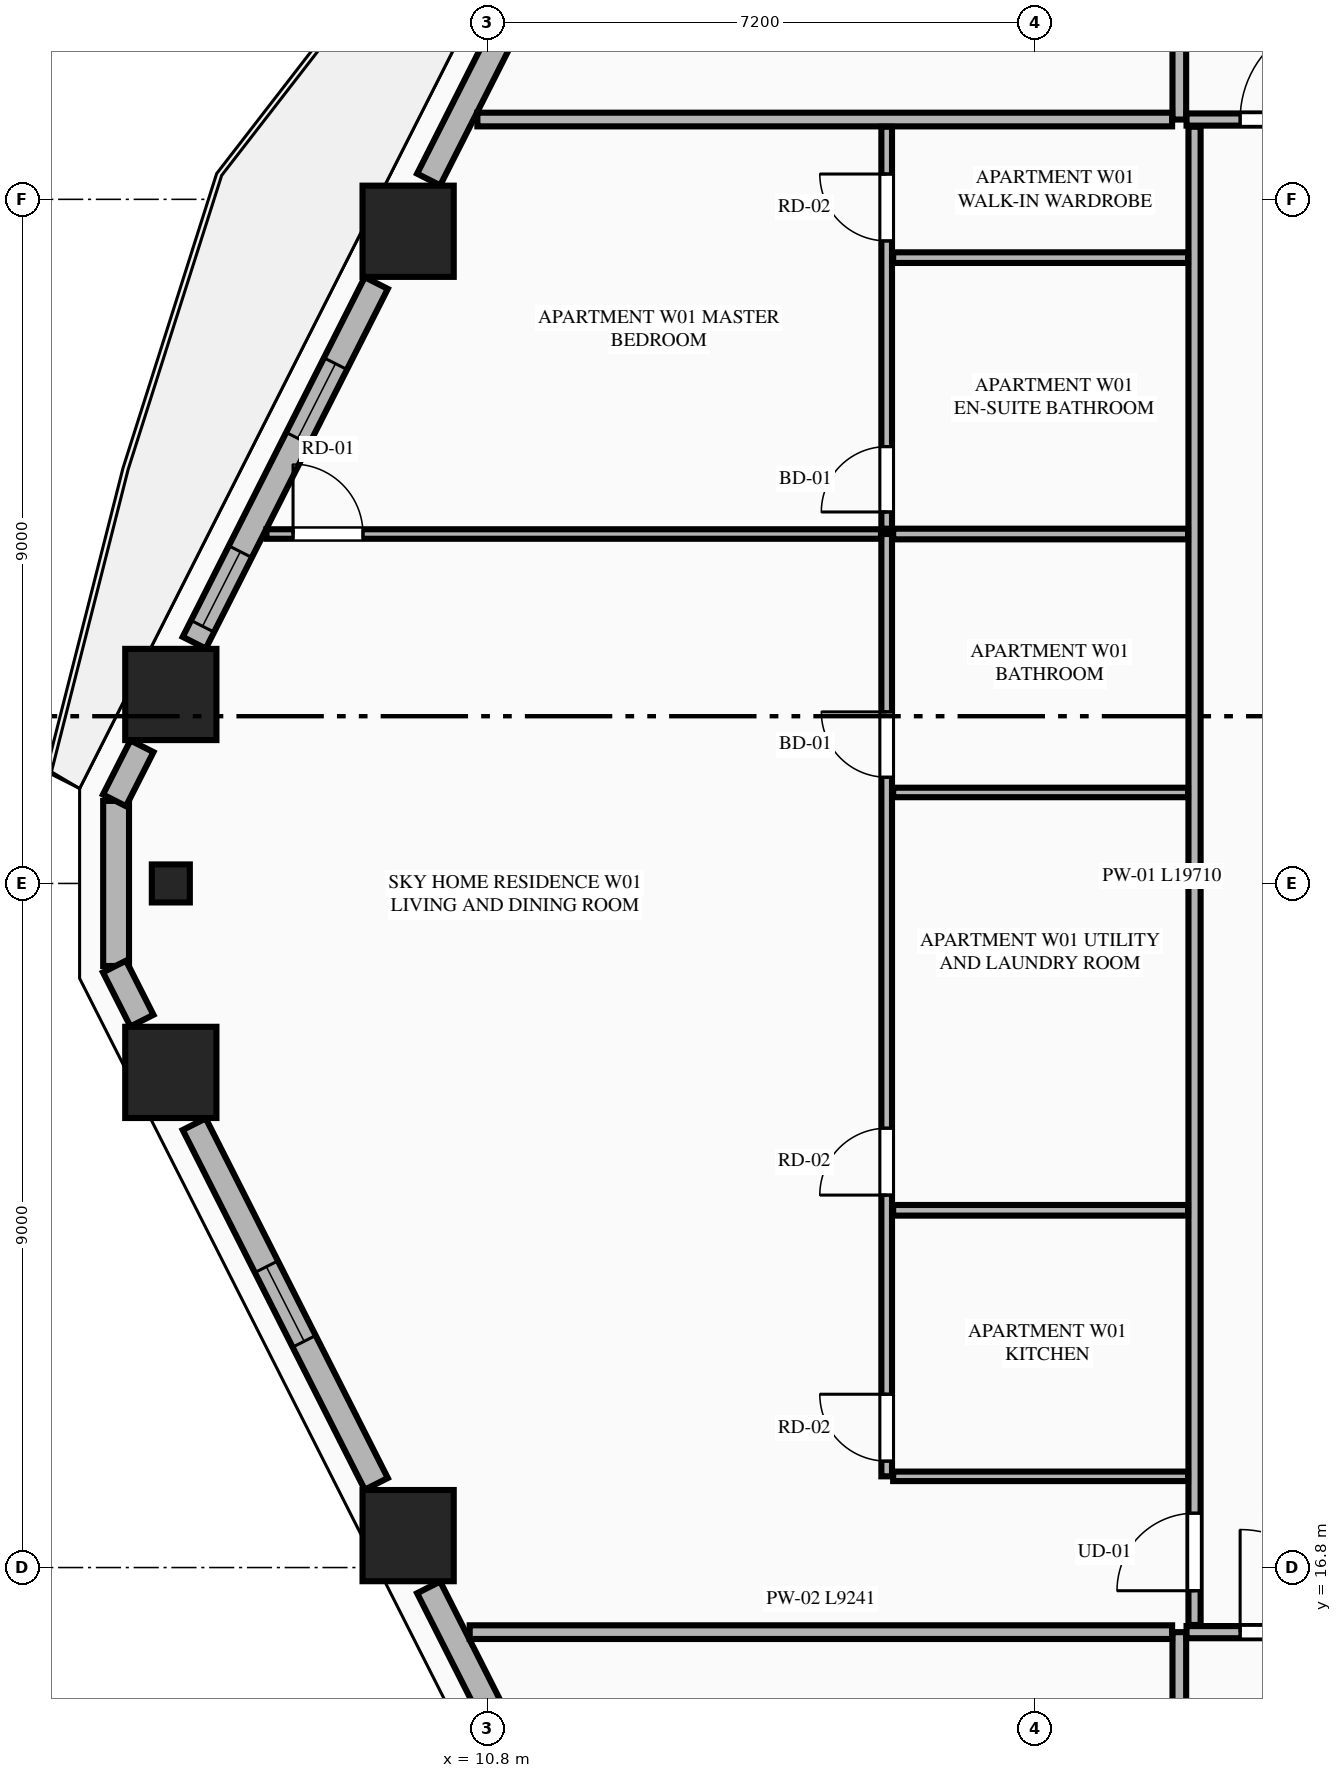
"""IFC4 building model, lengths in metres.
Left out: names, types, materials, properties, quantities, classifications, styles, units other than length and angle.
Written with IfcOpenShell. Run it as: python <this file> out.ifc"""

import sys

from ifc_helpers import new_model, si_unit, direction, frame, frame_2d, origin, origin_2d, place, context, subcontext, project, spatial, rectangle, extrude, element, fill, save


model = new_model("IFC4")
c1 = context("Model", 3, precision=1e-05, world=origin(), true_north=direction((0.0, 1.0)))
c2 = subcontext(c1, "Body", "Model", "MODEL_VIEW")
j1 = project(units=[si_unit("LENGTHUNIT", "METRE"), si_unit("PLANEANGLEUNIT", "RADIAN")], contexts=[c1])
p1 = place(None, origin())
s1 = spatial("IfcSite", under=j1, at=p1, CompositionType="ELEMENT")
p2 = place(p1, origin())
s2 = spatial("IfcBuilding", under=s1, at=p2, CompositionType="ELEMENT")
p3 = place(p2, frame((0.0, 0.0, 53.3)))
s3 = spatial("IfcBuildingStorey", under=s2, at=p3, CompositionType="ELEMENT", Elevation=53.3)
for number, where, z_axis, x_axis in (
    (1, (9.754, 34.38, 0.0), (0.0, 0.0, 1.0), (1.0, 0.0, 0.0)),
    (2, (6.632, 28.286, 0.0), (0.0, 0.0, 1.0), (1.0, 0.0, 0.0)),
    (3, (6.632, 23.314, 0.0), (0.0, 0.0, 1.0), (1.0, 0.0, 0.0)),
    (4, (9.754, 17.22, 0.0), (0.0, 0.0, 1.0), (1.0, 0.0, 0.0)),
):
    element("IfcColumn", number, at=place(p3, frame(where, z_axis=z_axis, x_axis=x_axis)), inside=s3, PredefinedType="COLUMN", context=c2, shape_type="SweptSolid", body=[
        extrude(rectangle(XDim=1.2, YDim=1.2, at=origin_2d()), origin(), (0.0, 0.0, 1.0), 3.55),
    ])
p4 = place(p3, frame((6.632, 25.8, 0.0), z_axis=(0.0, 0.0, 1.0), x_axis=(0.0, -1.0, 0.0)))
e5 = element("IfcColumn", 5, at=p4, inside=s3, PredefinedType="PILASTER", context=c2, shape_type="SweptSolid", body=[
    extrude(rectangle(XDim=0.5, YDim=0.35, at=origin_2d()), origin(), (0.0, 0.0, 1.0), 3.55),
])
p5 = place(p3, frame((5.912, 26.886, 0.0), z_axis=(0.0, 0.0, 1.0), x_axis=(0.0, -1.0, 0.0)))
e6 = element("IfcWall", 6, at=p5, inside=s3, PredefinedType="STANDARD", context=c2, shape_type="SweptSolid", body=[
    extrude(rectangle(XDim=2.172, YDim=0.34, at=frame_2d((1.086, 0.0))), origin(), (0.0, 0.0, 1.0), 3.33),
])
p6 = place(p3, frame((12.529, 40.01, 0.0), z_axis=(0.0, 0.0, 1.0), x_axis=(-0.451627137896, -0.892206774417, 0.0)))
e7 = element("IfcWall", 7, at=p6, inside=s3, PredefinedType="STANDARD", context=c2, shape_type="SweptSolid", body=[
    extrude(rectangle(XDim=5.547, YDim=0.34, at=frame_2d((2.773, 0.0))), origin(), (0.0, 0.0, 1.0), 2.787),
])
p7 = place(p6, frame((1.656, 0.0, 0.0)))
e8 = element("IfcOpeningElement", 8, at=p7, cuts=e7, PredefinedType="OPENING", context=c2, shape_type="SweptSolid", body=[
    extrude(rectangle(XDim=1.1, YDim=2.25, at=frame_2d((0.55, 1.125))), frame((0.0, 0.18, 0.0), z_axis=(0.0, -1.0, 0.0), x_axis=(1.0, 0.0, 0.0)), (0.0, 0.0, 1.0), 0.36),
])
p8 = place(p3, frame((9.335, 33.699, 0.0), z_axis=(0.0, 0.0, 1.0), x_axis=(-0.451590635984, -0.892225250422, 0.0)))
e9 = element("IfcWall", 9, at=p8, inside=s3, PredefinedType="STANDARD", context=c2, shape_type="SweptSolid", body=[
    extrude(rectangle(XDim=5.303, YDim=0.34, at=frame_2d((2.652, 0.0))), origin(), (0.0, 0.0, 1.0), 2.787),
])
p9 = place(p8, frame((1.189, 0.0, 0.75)))
e10 = element("IfcOpeningElement", 10, at=p9, cuts=e9, PredefinedType="OPENING", context=c2, shape_type="SweptSolid", body=[
    extrude(rectangle(XDim=1.1, YDim=1.887, at=frame_2d((0.55, 0.943))), frame((0.0, 0.18, 0.0), z_axis=(0.0, -1.0, 0.0), x_axis=(1.0, 0.0, 0.0)), (0.0, 0.0, 1.0), 0.36),
])
p10 = place(p8, frame((3.961, 0.0, 0.75)))
e11 = element("IfcOpeningElement", 11, at=p10, cuts=e9, PredefinedType="OPENING", context=c2, shape_type="SweptSolid", body=[
    extrude(rectangle(XDim=1.1, YDim=1.887, at=frame_2d((0.55, 0.943))), frame((0.0, 0.18, 0.0), z_axis=(0.0, -1.0, 0.0), x_axis=(1.0, 0.0, 0.0)), (0.0, 0.0, 1.0), 0.36),
])
for number, where, z_axis, x_axis in (
    (12, (6.252, 27.605, 0.0), (0.0, 0.0, 1.0), (-0.452, -0.892, 0.0)),
    (13, (5.891, 24.707, 0.0), (0.0, 0.0, 1.0), (0.452, -0.892, 0.0)),
):
    element("IfcWall", number, at=place(p3, frame(where, z_axis=z_axis, x_axis=x_axis)), inside=s3, PredefinedType="STANDARD", context=c2, shape_type="SweptSolid", body=[
        extrude(rectangle(XDim=0.798, YDim=0.34, at=frame_2d((0.399, 0.0))), origin(), (0.0, 0.0, 1.0), 3.33),
    ])
p11 = place(p3, frame((6.94, 22.633, 0.0), z_axis=(0.0, 0.0, 1.0), x_axis=(0.451572088722, -0.892234637686, 0.0)))
e14 = element("IfcWall", 14, at=p11, inside=s3, PredefinedType="STANDARD", context=c2, shape_type="SweptSolid", body=[
    extrude(rectangle(XDim=5.304, YDim=0.34, at=frame_2d((2.652, 0.0))), origin(), (0.0, 0.0, 1.0), 2.787),
])
p12 = place(p11, frame((2.102, 0.0, 0.75)))
e15 = element("IfcOpeningElement", 15, at=p12, cuts=e14, PredefinedType="OPENING", context=c2, shape_type="SweptSolid", body=[
    extrude(rectangle(XDim=1.1, YDim=1.887, at=frame_2d((0.55, 0.943))), frame((0.0, 0.18, 0.0), z_axis=(0.0, -1.0, 0.0), x_axis=(1.0, 0.0, 0.0)), (0.0, 0.0, 1.0), 0.36),
])
p13 = place(p3, frame((10.024, 16.539, 0.0), z_axis=(0.0, 0.0, 1.0), x_axis=(0.451627137896, -0.892206774417, 0.0)))
e16 = element("IfcWall", 16, at=p13, inside=s3, PredefinedType="STANDARD", context=c2, shape_type="SweptSolid", body=[
    extrude(rectangle(XDim=5.547, YDim=0.34, at=frame_2d((2.773, 0.0))), origin(), (0.0, 0.0, 1.0), 2.787),
])
p14 = place(p13, frame((2.223, 0.0, 0.75)))
e17 = element("IfcOpeningElement", 17, at=p14, cuts=e16, PredefinedType="OPENING", context=c2, shape_type="SweptSolid", body=[
    extrude(rectangle(XDim=1.1, YDim=1.887, at=frame_2d((0.55, 0.943))), frame((0.0, 0.18, 0.0), z_axis=(0.0, -1.0, 0.0), x_axis=(1.0, 0.0, 0.0)), (0.0, 0.0, 1.0), 0.36),
])
p15 = place(p3, frame((19.9, 2.455, 0.0), z_axis=(0.0, 0.0, 1.0), x_axis=(0.0, 1.0, 0.0)))
e18 = element("IfcWall", 18, at=p15, inside=s3, PredefinedType="PARTITIONING", context=c2, shape_type="SweptSolid", body=[
    extrude(rectangle(XDim=13.495, YDim=0.18, at=frame_2d((6.748, 0.0))), origin(), (0.0, 0.0, 1.0), 3.33),
])
p16 = place(p3, frame((19.995, 15.95, 0.0), z_axis=(0.0, 0.0, 1.0), x_axis=(1.0, 0.0, 0.0)))
e19 = element("IfcWall", 19, at=p16, inside=s3, PredefinedType="PARTITIONING", context=c2, shape_type="SweptSolid", body=[
    extrude(rectangle(XDim=16.432, YDim=0.16, at=frame_2d((8.216, 0.0))), origin(), (0.0, 0.0, 1.0), 3.33),
])
p17 = place(p16, frame((0.705, 0.0, 0.0)))
e20 = element("IfcOpeningElement", 20, at=p17, cuts=e19, PredefinedType="OPENING", context=c2, shape_type="SweptSolid", body=[
    extrude(rectangle(XDim=1.35, YDim=2.35, at=frame_2d((0.675, 1.175))), frame((0.0, 0.09, 0.0), z_axis=(0.0, -1.0, 0.0), x_axis=(1.0, 0.0, 0.0)), (0.0, 0.0, 1.0), 0.18),
])
p18 = place(p3, frame((19.9, 35.85, 0.0), z_axis=(0.0, 0.0, 1.0), x_axis=(0.0, 1.0, 0.0)))
e21 = element("IfcWall", 21, at=p18, inside=s3, PredefinedType="PARTITIONING", context=c2, shape_type="SweptSolid", body=[
    extrude(rectangle(XDim=13.295, YDim=0.18, at=frame_2d((6.647, 0.0))), origin(), (0.0, 0.0, 1.0), 3.33),
])
p19 = place(p3, frame((19.995, 35.85, 0.0), z_axis=(0.0, 0.0, 1.0), x_axis=(1.0, 0.0, 0.0)))
e22 = element("IfcWall", 22, at=p19, inside=s3, PredefinedType="PARTITIONING", context=c2, shape_type="SweptSolid", body=[
    extrude(rectangle(XDim=16.432, YDim=0.16, at=frame_2d((8.216, 0.0))), origin(), (0.0, 0.0, 1.0), 3.33),
])
p20 = place(p19, frame((0.705, 0.0, 0.0)))
e23 = element("IfcOpeningElement", 23, at=p20, cuts=e22, PredefinedType="OPENING", context=c2, shape_type="SweptSolid", body=[
    extrude(rectangle(XDim=1.35, YDim=2.35, at=frame_2d((0.675, 1.175))), frame((0.0, 0.09, 0.0), z_axis=(0.0, -1.0, 0.0), x_axis=(1.0, 0.0, 0.0)), (0.0, 0.0, 1.0), 0.18),
])
p21 = place(p3, frame((10.564, 15.95, 0.0), z_axis=(0.0, 0.0, 1.0), x_axis=(1.0, 0.0, 0.0)))
e24 = element("IfcWall", 24, at=p21, inside=s3, PredefinedType="PARTITIONING", context=c2, shape_type="SweptSolid", body=[
    extrude(rectangle(XDim=9.241, YDim=0.18, at=frame_2d((4.621, 0.0))), origin(), (0.0, 0.0, 1.0), 3.33),
])
p22 = place(p3, frame((10.665, 35.85, 0.0), z_axis=(0.0, 0.0, 1.0), x_axis=(1.0, 0.0, 0.0)))
e25 = element("IfcWall", 25, at=p22, inside=s3, PredefinedType="PARTITIONING", context=c2, shape_type="SweptSolid", body=[
    extrude(rectangle(XDim=9.14, YDim=0.18, at=frame_2d((4.57, 0.0))), origin(), (0.0, 0.0, 1.0), 3.33),
])
p23 = place(p3, frame((20.1, 16.045, 0.0), z_axis=(0.0, 0.0, 1.0), x_axis=(0.0, 1.0, 0.0)))
e26 = element("IfcWall", 26, at=p23, inside=s3, PredefinedType="PARTITIONING", context=c2, shape_type="SweptSolid", body=[
    extrude(rectangle(XDim=19.71, YDim=0.16, at=frame_2d((9.855, 0.0))), origin(), (0.0, 0.0, 1.0), 3.33),
])
p24 = place(p23, frame((0.45, 0.0, 0.0)))
e27 = element("IfcOpeningElement", 27, at=p24, cuts=e26, PredefinedType="OPENING", context=c2, shape_type="SweptSolid", body=[
    extrude(rectangle(XDim=1.02, YDim=2.25, at=frame_2d((0.51, 1.125))), frame((0.0, 0.09, 0.0), z_axis=(0.0, -1.0, 0.0), x_axis=(1.0, 0.0, 0.0)), (0.0, 0.0, 1.0), 0.18),
])
p25 = place(p3, frame((16.135, 18.0, 0.0), z_axis=(0.0, 0.0, 1.0), x_axis=(1.0, 0.0, 0.0)))
e28 = element("IfcWall", 28, at=p25, inside=s3, PredefinedType="PARTITIONING", context=c2, shape_type="SweptSolid", body=[
    extrude(rectangle(XDim=3.88, YDim=0.125, at=frame_2d((1.94, 0.0))), origin(), (0.0, 0.0, 1.0), 2.637),
])
p26 = place(p3, frame((16.05, 18.0, 0.0), z_axis=(0.0, 0.0, 1.0), x_axis=(0.0, 1.0, 0.0)))
e29 = element("IfcWall", 29, at=p26, inside=s3, PredefinedType="PLUMBINGWALL", context=c2, shape_type="SweptSolid", body=[
    extrude(rectangle(XDim=12.397, YDim=0.14, at=frame_2d((6.198, 0.0))), origin(), (0.0, 0.0, 1.0), 3.33),
])
p27 = place(p26, frame((0.2, 0.0, 0.0)))
e30 = element("IfcOpeningElement", 30, at=p27, cuts=e29, PredefinedType="OPENING", context=c2, shape_type="SweptSolid", body=[
    extrude(rectangle(XDim=0.88, YDim=2.15, at=frame_2d((0.44, 1.075))), frame((0.0, 0.08, 0.0), z_axis=(0.0, -1.0, 0.0), x_axis=(1.0, 0.0, 0.0)), (0.0, 0.0, 1.0), 0.16),
])
p28 = place(p26, frame((3.7, 0.0, 0.0)))
e31 = element("IfcOpeningElement", 31, at=p28, cuts=e29, PredefinedType="OPENING", context=c2, shape_type="SweptSolid", body=[
    extrude(rectangle(XDim=0.88, YDim=2.15, at=frame_2d((0.44, 1.075))), frame((0.0, 0.08, 0.0), z_axis=(0.0, -1.0, 0.0), x_axis=(1.0, 0.0, 0.0)), (0.0, 0.0, 1.0), 0.16),
])
p29 = place(p26, frame((9.197, 0.0, 0.0)))
e32 = element("IfcOpeningElement", 32, at=p29, cuts=e29, PredefinedType="OPENING", context=c2, shape_type="SweptSolid", body=[
    extrude(rectangle(XDim=0.86, YDim=2.1, at=frame_2d((0.43, 1.05))), frame((0.0, 0.08, 0.0), z_axis=(0.0, -1.0, 0.0), x_axis=(1.0, 0.0, 0.0)), (0.0, 0.0, 1.0), 0.16),
])
p30 = place(p3, frame((16.05, 30.467, 0.0), z_axis=(0.0, 0.0, 1.0), x_axis=(0.0, 1.0, 0.0)))
e33 = element("IfcWall", 33, at=p30, inside=s3, PredefinedType="PLUMBINGWALL", context=c2, shape_type="SweptSolid", body=[
    extrude(rectangle(XDim=5.288, YDim=0.14, at=frame_2d((2.644, 0.0))), origin(), (0.0, 0.0, 1.0), 3.33),
])
p31 = place(p30, frame((0.22, 0.0, 0.0)))
e34 = element("IfcOpeningElement", 34, at=p31, cuts=e33, PredefinedType="OPENING", context=c2, shape_type="SweptSolid", body=[
    extrude(rectangle(XDim=0.86, YDim=2.1, at=frame_2d((0.43, 1.05))), frame((0.0, 0.08, 0.0), z_axis=(0.0, -1.0, 0.0), x_axis=(1.0, 0.0, 0.0)), (0.0, 0.0, 1.0), 0.16),
])
p32 = place(p30, frame((3.786, 0.0, 0.0)))
e35 = element("IfcOpeningElement", 35, at=p32, cuts=e33, PredefinedType="OPENING", context=c2, shape_type="SweptSolid", body=[
    extrude(rectangle(XDim=0.88, YDim=2.15, at=frame_2d((0.44, 1.075))), frame((0.0, 0.08, 0.0), z_axis=(0.0, -1.0, 0.0), x_axis=(1.0, 0.0, 0.0)), (0.0, 0.0, 1.0), 0.16),
])
p33 = place(p3, frame((16.135, 30.397, 0.0), z_axis=(0.0, 0.0, 1.0), x_axis=(1.0, 0.0, 0.0)))
e36 = element("IfcWall", 36, at=p33, inside=s3, PredefinedType="PLUMBINGWALL", context=c2, shape_type="SweptSolid", body=[
    extrude(rectangle(XDim=3.88, YDim=0.14, at=frame_2d((1.94, 0.0))), origin(), (0.0, 0.0, 1.0), 3.33),
])
p34 = place(p3, frame((7.89, 30.397, 0.0), z_axis=(0.0, 0.0, 1.0), x_axis=(1.0, 0.0, 0.0)))
e37 = element("IfcWall", 37, at=p34, inside=s3, PredefinedType="PARTITIONING", context=c2, shape_type="SweptSolid", body=[
    extrude(rectangle(XDim=8.085, YDim=0.125, at=frame_2d((4.042, 0.0))), origin(), (0.0, 0.0, 1.0), 3.33),
])
p35 = place(p34, frame((0.35, 0.0, 0.0)))
e38 = element("IfcOpeningElement", 38, at=p35, cuts=e37, PredefinedType="OPENING", context=c2, shape_type="SweptSolid", body=[
    extrude(rectangle(XDim=0.92, YDim=2.15, at=frame_2d((0.46, 1.075))), frame((0.0, 0.073, 0.0), z_axis=(0.0, -1.0, 0.0), x_axis=(1.0, 0.0, 0.0)), (0.0, 0.0, 1.0), 0.145),
])
p36 = place(p3, frame((16.135, 21.5, 0.0), z_axis=(0.0, 0.0, 1.0), x_axis=(1.0, 0.0, 0.0)))
e39 = element("IfcWall", 39, at=p36, inside=s3, PredefinedType="PLUMBINGWALL", context=c2, shape_type="SweptSolid", body=[
    extrude(rectangle(XDim=3.88, YDim=0.14, at=frame_2d((1.94, 0.0))), origin(), (0.0, 0.0, 1.0), 3.33),
])
p37 = place(p3, frame((16.135, 26.997, 0.0), z_axis=(0.0, 0.0, 1.0), x_axis=(1.0, 0.0, 0.0)))
e40 = element("IfcWall", 40, at=p37, inside=s3, PredefinedType="PARTITIONING", context=c2, shape_type="SweptSolid", body=[
    extrude(rectangle(XDim=3.88, YDim=0.125, at=frame_2d((1.94, 0.0))), origin(), (0.0, 0.0, 1.0), 3.33),
])
p38 = place(p3, frame((16.135, 34.033, 0.0), z_axis=(0.0, 0.0, 1.0), x_axis=(1.0, 0.0, 0.0)))
e41 = element("IfcWall", 41, at=p38, inside=s3, PredefinedType="PLUMBINGWALL", context=c2, shape_type="SweptSolid", body=[
    extrude(rectangle(XDim=3.88, YDim=0.14, at=frame_2d((1.94, 0.0))), origin(), (0.0, 0.0, 1.0), 2.637),
])
p39 = place(p9, origin())
e42 = element("IfcWindow", 42, at=p39, inside=s3, PartitioningType="SINGLE_PANEL", PredefinedType="WINDOW", context=c2, shape_type="SweptSolid", body=[
    extrude(rectangle(XDim=1.1, YDim=1.887, at=frame_2d((0.55, 0.943))), frame((0.0, 0.03, 0.0), z_axis=(0.0, -1.0, 0.0), x_axis=(1.0, 0.0, 0.0)), (0.0, 0.0, 1.0), 0.06),
])
fill(e10, e42)
p40 = place(p12, origin())
e43 = element("IfcWindow", 43, at=p40, inside=s3, PartitioningType="SINGLE_PANEL", PredefinedType="WINDOW", context=c2, shape_type="SweptSolid", body=[
    extrude(rectangle(XDim=1.1, YDim=1.887, at=frame_2d((0.55, 0.943))), frame((0.0, 0.03, 0.0), z_axis=(0.0, -1.0, 0.0), x_axis=(1.0, 0.0, 0.0)), (0.0, 0.0, 1.0), 0.06),
])
fill(e15, e43)
p41 = place(p17, origin())
e44 = element("IfcDoor", 44, at=p41, inside=s3, OperationType="SINGLE_SWING_LEFT", PredefinedType="DOOR", context=c2, shape_type="SweptSolid", body=[
    extrude(rectangle(XDim=1.35, YDim=2.35, at=frame_2d((0.675, 1.175))), frame((0.0, 0.025, 0.0), z_axis=(0.0, -1.0, 0.0), x_axis=(1.0, 0.0, 0.0)), (0.0, 0.0, 1.0), 0.05),
])
fill(e20, e44)
p42 = place(p20, origin())
e45 = element("IfcDoor", 45, at=p42, inside=s3, OperationType="SINGLE_SWING_RIGHT", PredefinedType="DOOR", context=c2, shape_type="SweptSolid", body=[
    extrude(rectangle(XDim=1.35, YDim=2.35, at=frame_2d((0.675, 1.175))), frame((0.0, 0.025, 0.0), z_axis=(0.0, -1.0, 0.0), x_axis=(1.0, 0.0, 0.0)), (0.0, 0.0, 1.0), 0.05),
])
fill(e23, e45)
p43 = place(p27, origin())
e46 = element("IfcDoor", 46, at=p43, inside=s3, OperationType="SINGLE_SWING_RIGHT", PredefinedType="DOOR", context=c2, shape_type="SweptSolid", body=[
    extrude(rectangle(XDim=0.88, YDim=2.15, at=frame_2d((0.44, 1.075))), frame((0.0, 0.025, 0.0), z_axis=(0.0, -1.0, 0.0), x_axis=(1.0, 0.0, 0.0)), (0.0, 0.0, 1.0), 0.05),
])
fill(e30, e46)
p44 = place(p28, origin())
e47 = element("IfcDoor", 47, at=p44, inside=s3, OperationType="SINGLE_SWING_LEFT", PredefinedType="DOOR", context=c2, shape_type="SweptSolid", body=[
    extrude(rectangle(XDim=0.88, YDim=2.15, at=frame_2d((0.44, 1.075))), frame((0.0, 0.025, 0.0), z_axis=(0.0, -1.0, 0.0), x_axis=(1.0, 0.0, 0.0)), (0.0, 0.0, 1.0), 0.05),
])
fill(e31, e47)
p45 = place(p29, origin())
e48 = element("IfcDoor", 48, at=p45, inside=s3, OperationType="SINGLE_SWING_RIGHT", PredefinedType="DOOR", context=c2, shape_type="SweptSolid", body=[
    extrude(rectangle(XDim=0.86, YDim=2.1, at=frame_2d((0.43, 1.05))), frame((0.0, 0.025, 0.0), z_axis=(0.0, -1.0, 0.0), x_axis=(1.0, 0.0, 0.0)), (0.0, 0.0, 1.0), 0.05),
])
fill(e32, e48)
p46 = place(p31, origin())
e49 = element("IfcDoor", 49, at=p46, inside=s3, OperationType="SINGLE_SWING_LEFT", PredefinedType="DOOR", context=c2, shape_type="SweptSolid", body=[
    extrude(rectangle(XDim=0.86, YDim=2.1, at=frame_2d((0.43, 1.05))), frame((0.0, 0.025, 0.0), z_axis=(0.0, -1.0, 0.0), x_axis=(1.0, 0.0, 0.0)), (0.0, 0.0, 1.0), 0.05),
])
fill(e34, e49)
p47 = place(p32, origin())
e50 = element("IfcDoor", 50, at=p47, inside=s3, OperationType="SINGLE_SWING_RIGHT", PredefinedType="DOOR", context=c2, shape_type="SweptSolid", body=[
    extrude(rectangle(XDim=0.88, YDim=2.15, at=frame_2d((0.44, 1.075))), frame((0.0, 0.025, 0.0), z_axis=(0.0, -1.0, 0.0), x_axis=(1.0, 0.0, 0.0)), (0.0, 0.0, 1.0), 0.05),
])
fill(e35, e50)
p48 = place(p24, origin())
e51 = element("IfcDoor", 51, at=p48, inside=s3, OperationType="SINGLE_SWING_LEFT", PredefinedType="DOOR", context=c2, shape_type="SweptSolid", body=[
    extrude(rectangle(XDim=1.02, YDim=2.25, at=frame_2d((0.51, 1.125))), frame((0.0, 0.025, 0.0), z_axis=(0.0, -1.0, 0.0), x_axis=(1.0, 0.0, 0.0)), (0.0, 0.0, 1.0), 0.05),
])
fill(e27, e51)
p49 = place(p35, origin())
e52 = element("IfcDoor", 52, at=p49, inside=s3, OperationType="SINGLE_SWING_LEFT", PredefinedType="DOOR", context=c2, shape_type="SweptSolid", body=[
    extrude(rectangle(XDim=0.92, YDim=2.15, at=frame_2d((0.46, 1.075))), frame((0.0, 0.025, 0.0), z_axis=(0.0, -1.0, 0.0), x_axis=(1.0, 0.0, 0.0)), (0.0, 0.0, 1.0), 0.05),
])
fill(e38, e52)
p50 = place(p10, origin())
e53 = element("IfcWindow", 53, at=p50, inside=s3, PartitioningType="SINGLE_PANEL", PredefinedType="WINDOW", context=c2, shape_type="SweptSolid", body=[
    extrude(rectangle(XDim=1.1, YDim=1.887, at=frame_2d((0.55, 0.943))), frame((0.0, 0.03, 0.0), z_axis=(0.0, -1.0, 0.0), x_axis=(1.0, 0.0, 0.0)), (0.0, 0.0, 1.0), 0.06),
])
fill(e11, e53)
save(model, sys.argv[1])
